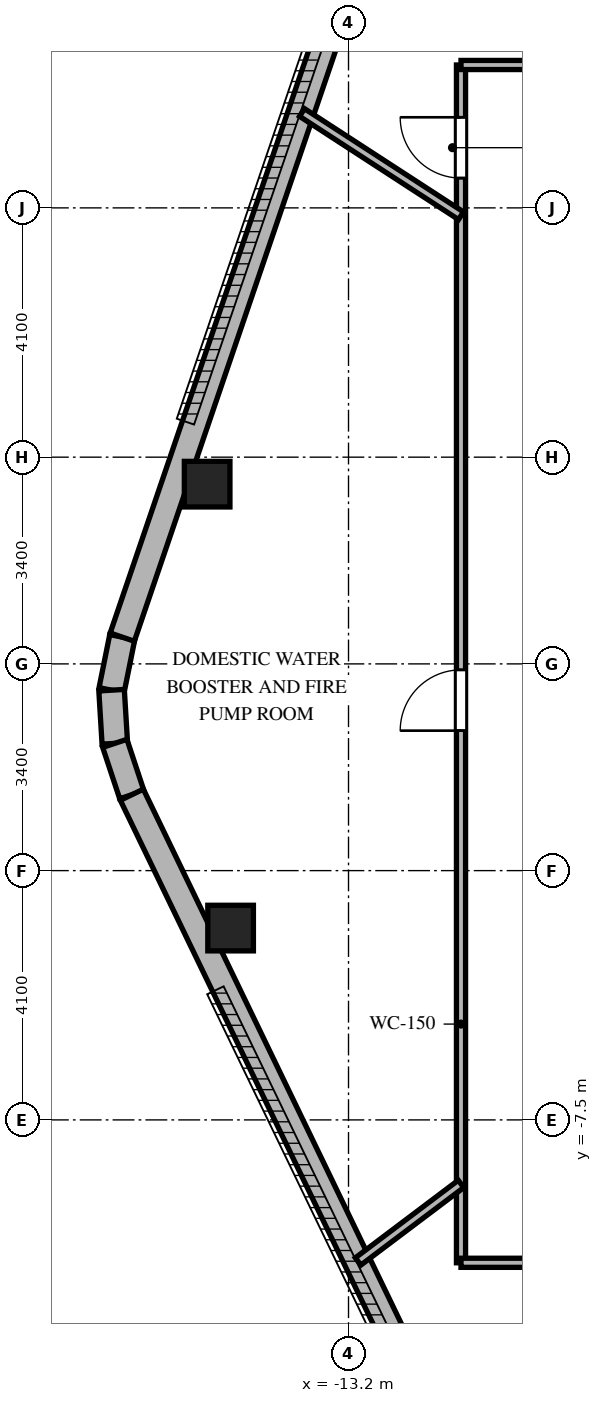
"""IFC4 building model, lengths in metres.
Left out: names, types, materials, properties, quantities, classifications, styles, units other than length and angle.
Written with IfcOpenShell. Run it as: python <this file> out.ifc"""

import sys

from ifc_helpers import new_model, si_unit, direction, frame, frame_2d, origin, origin_2d, place, context, subcontext, project, spatial, rectangle, extrude, element, fill, save


model = new_model("IFC4")
c1 = context("Model", 3, precision=1e-05, world=origin(), true_north=direction((0.0, 1.0)))
c2 = subcontext(c1, "Body", "Model", "MODEL_VIEW")
j1 = project(units=[si_unit("LENGTHUNIT", "METRE"), si_unit("PLANEANGLEUNIT", "RADIAN")], contexts=[c1])
p1 = place(None, origin())
s1 = spatial("IfcSite", under=j1, at=p1, CompositionType="ELEMENT")
p2 = place(p1, origin())
s2 = spatial("IfcBuilding", under=s1, at=p2, CompositionType="ELEMENT")
p3 = place(p2, frame((0.0, 0.0, 315.9)))
s3 = spatial("IfcBuildingStorey", under=s2, at=p3, CompositionType="ELEMENT", Elevation=315.9)
for number, where, z_axis, x_axis in (
    (1, (-15.525, 2.956, 0.0), (0.0, 0.0, 1.0), (1.0, 0.0, 0.0)),
    (2, (-15.139, -4.345, 0.0), (0.0, 0.0, 1.0), (1.0, 0.0, 0.0)),
):
    element("IfcColumn", number, at=place(p3, frame(where, z_axis=z_axis, x_axis=x_axis)), inside=s3, PredefinedType="COLUMN", context=c2, shape_type="SweptSolid", body=[
        extrude(rectangle(XDim=0.75, YDim=0.75, at=origin_2d()), origin(), (0.0, 0.0, 1.0), 5.5),
    ])
p4 = place(p3, frame((-16.921, 0.44, 0.0), z_axis=(0.0, 0.0, 1.0), x_axis=(-0.197170749138, -0.980369162961, 0.0)))
e3 = element("IfcWall", 3, at=p4, inside=s3, PredefinedType="SOLIDWALL", context=c2, shape_type="SweptSolid", body=[
    extrude(rectangle(XDim=0.89, YDim=0.42, at=frame_2d((0.445, 0.0))), origin(), (0.0, 0.0, 1.0), 5.18),
])
p5 = place(p3, frame((-17.096, -0.433, 0.0), z_axis=(0.0, 0.0, 1.0), x_axis=(0.060469820114, -0.998170026025, 0.0)))
e4 = element("IfcWall", 4, at=p5, inside=s3, PredefinedType="SOLIDWALL", context=c2, shape_type="SweptSolid", body=[
    extrude(rectangle(XDim=0.876, YDim=0.42, at=frame_2d((0.438, 0.0))), origin(), (0.0, 0.0, 1.0), 5.18),
])
p6 = place(p3, frame((-17.043, -1.307, 0.0), z_axis=(0.0, 0.0, 1.0), x_axis=(0.314581701602, -0.949230400386, 0.0)))
e5 = element("IfcWall", 5, at=p6, inside=s3, PredefinedType="SOLIDWALL", context=c2, shape_type="SweptSolid", body=[
    extrude(rectangle(XDim=0.89, YDim=0.42, at=frame_2d((0.445, 0.0))), origin(), (0.0, 0.0, 1.0), 5.18),
])
p7 = place(p3, frame((-12.344, 13.873, 0.0), z_axis=(0.0, 0.0, 1.0), x_axis=(-0.322553427155, -0.946551259378, 0.0)))
e6 = element("IfcWall", 6, at=p7, inside=s3, PredefinedType="SOLIDWALL", context=c2, shape_type="SweptSolid", body=[
    extrude(rectangle(XDim=14.191, YDim=0.42, at=frame_2d((7.096, 0.0))), origin(), (0.0, 0.0, 1.0), 5.18),
])
p8 = place(p3, frame((-16.763, -2.152, 0.0), z_axis=(0.0, 0.0, 1.0), x_axis=(0.434664735238, -0.900592342817, 0.0)))
e7 = element("IfcWall", 7, at=p8, inside=s3, PredefinedType="SOLIDWALL", context=c2, shape_type="SweptSolid", body=[
    extrude(rectangle(XDim=13.44, YDim=0.42, at=frame_2d((6.72, 0.0))), origin(), (0.0, 0.0, 1.0), 5.18),
])
p9 = place(p3, frame((-11.35, -9.85, 0.0), z_axis=(0.0, 0.0, 1.0), x_axis=(0.0, 1.0, 0.0)))
e8 = element("IfcWall", 8, at=p9, inside=s3, PredefinedType="PARTITIONING", context=c2, shape_type="SweptSolid", body=[
    extrude(rectangle(XDim=19.7, YDim=0.15, at=frame_2d((9.85, 0.0))), origin(), (0.0, 0.0, 1.0), 4.67),
])
p10 = place(p9, frame((17.84, 0.0, 0.0)))
e9 = element("IfcOpeningElement", 9, at=p10, cuts=e8, PredefinedType="OPENING", context=c2, shape_type="SweptSolid", body=[
    extrude(rectangle(XDim=1.0, YDim=2.15, at=frame_2d((0.5, 1.075))), frame((0.0, 0.085, 0.0), z_axis=(0.0, -1.0, 0.0), x_axis=(1.0, 0.0, 0.0)), (0.0, 0.0, 1.0), 0.17),
])
p11 = place(p9, frame((8.752, 0.0, 0.0)))
e10 = element("IfcOpeningElement", 10, at=p11, cuts=e8, PredefinedType="OPENING", context=c2, shape_type="SweptSolid", body=[
    extrude(rectangle(XDim=1.0, YDim=2.15, at=frame_2d((0.5, 1.075))), frame((0.0, 0.085, 0.0), z_axis=(0.0, -1.0, 0.0), x_axis=(1.0, 0.0, 0.0)), (0.0, 0.0, 1.0), 0.17),
])
p12 = place(p3, frame((-11.35, 9.85, 0.0), z_axis=(0.0, 0.0, 1.0), x_axis=(1.0, 0.0, 0.0)))
e11 = element("IfcWall", 11, at=p12, inside=s3, PredefinedType="PARTITIONING", context=c2, shape_type="SweptSolid", body=[
    extrude(rectangle(XDim=22.7, YDim=0.15, at=frame_2d((11.35, 0.0))), origin(), (0.0, 0.0, 1.0), 4.67),
])
p13 = place(p12, frame((17.542, 0.0, 0.0)))
e12 = element("IfcOpeningElement", 12, at=p13, cuts=e11, PredefinedType="OPENING", context=c2, shape_type="SweptSolid", body=[
    extrude(rectangle(XDim=1.0, YDim=2.15, at=frame_2d((0.5, 1.075))), frame((0.0, 0.085, 0.0), z_axis=(0.0, -1.0, 0.0), x_axis=(1.0, 0.0, 0.0)), (0.0, 0.0, 1.0), 0.17),
])
p14 = place(p3, frame((11.35, -9.85, 0.0), z_axis=(0.0, 0.0, 1.0), x_axis=(-1.0, 0.0, 0.0)))
e13 = element("IfcWall", 13, at=p14, inside=s3, PredefinedType="PARTITIONING", context=c2, shape_type="SweptSolid", body=[
    extrude(rectangle(XDim=22.7, YDim=0.15, at=frame_2d((11.35, 0.0))), origin(), (0.0, 0.0, 1.0), 4.67),
])
p15 = place(p14, frame((14.894, 0.0, 0.0)))
e14 = element("IfcOpeningElement", 14, at=p15, cuts=e13, PredefinedType="OPENING", context=c2, shape_type="SweptSolid", body=[
    extrude(rectangle(XDim=1.0, YDim=2.15, at=frame_2d((0.5, 1.075))), frame((0.0, 0.085, 0.0), z_axis=(0.0, -1.0, 0.0), x_axis=(1.0, 0.0, 0.0)), (0.0, 0.0, 1.0), 0.17),
])
p16 = place(p3, frame((-11.35, 7.371, 0.0), z_axis=(0.0, 0.0, 1.0), x_axis=(-0.83868866546, 0.544611166272, 0.0)))
e15 = element("IfcWall", 15, at=p16, inside=s3, PredefinedType="PARTITIONING", context=c2, shape_type="SweptSolid", body=[
    extrude(rectangle(XDim=3.117, YDim=0.15, at=frame_2d((1.559, 0.0))), origin(), (0.0, 0.0, 1.0), 4.52),
])
p17 = place(p3, frame((-11.35, -8.553, 0.0), z_axis=(0.0, 0.0, 1.0), x_axis=(-0.798587297605, -0.601878997892, 0.0)))
e16 = element("IfcWall", 16, at=p17, inside=s3, PredefinedType="PARTITIONING", context=c2, shape_type="SweptSolid", body=[
    extrude(rectangle(XDim=2.119, YDim=0.15, at=frame_2d((1.059, 0.0))), origin(), (0.0, 0.0, 1.0), 4.52),
])
p18 = place(p10, origin())
e17 = element("IfcDoor", 17, at=p18, inside=s3, OperationType="SINGLE_SWING_RIGHT", PredefinedType="DOOR", context=c2, shape_type="SweptSolid", body=[
    extrude(rectangle(XDim=1.0, YDim=2.15, at=frame_2d((0.5, 1.075))), frame((0.0, 0.025, 0.0), z_axis=(0.0, -1.0, 0.0), x_axis=(1.0, 0.0, 0.0)), (0.0, 0.0, 1.0), 0.05),
])
fill(e9, e17)
p19 = place(p11, origin())
e18 = element("IfcDoor", 18, at=p19, inside=s3, OperationType="SINGLE_SWING_LEFT", PredefinedType="DOOR", context=c2, shape_type="SweptSolid", body=[
    extrude(rectangle(XDim=1.0, YDim=2.15, at=frame_2d((0.5, 1.075))), frame((0.0, 0.025, 0.0), z_axis=(0.0, -1.0, 0.0), x_axis=(1.0, 0.0, 0.0)), (0.0, 0.0, 1.0), 0.05),
])
fill(e10, e18)
save(model, sys.argv[1])
